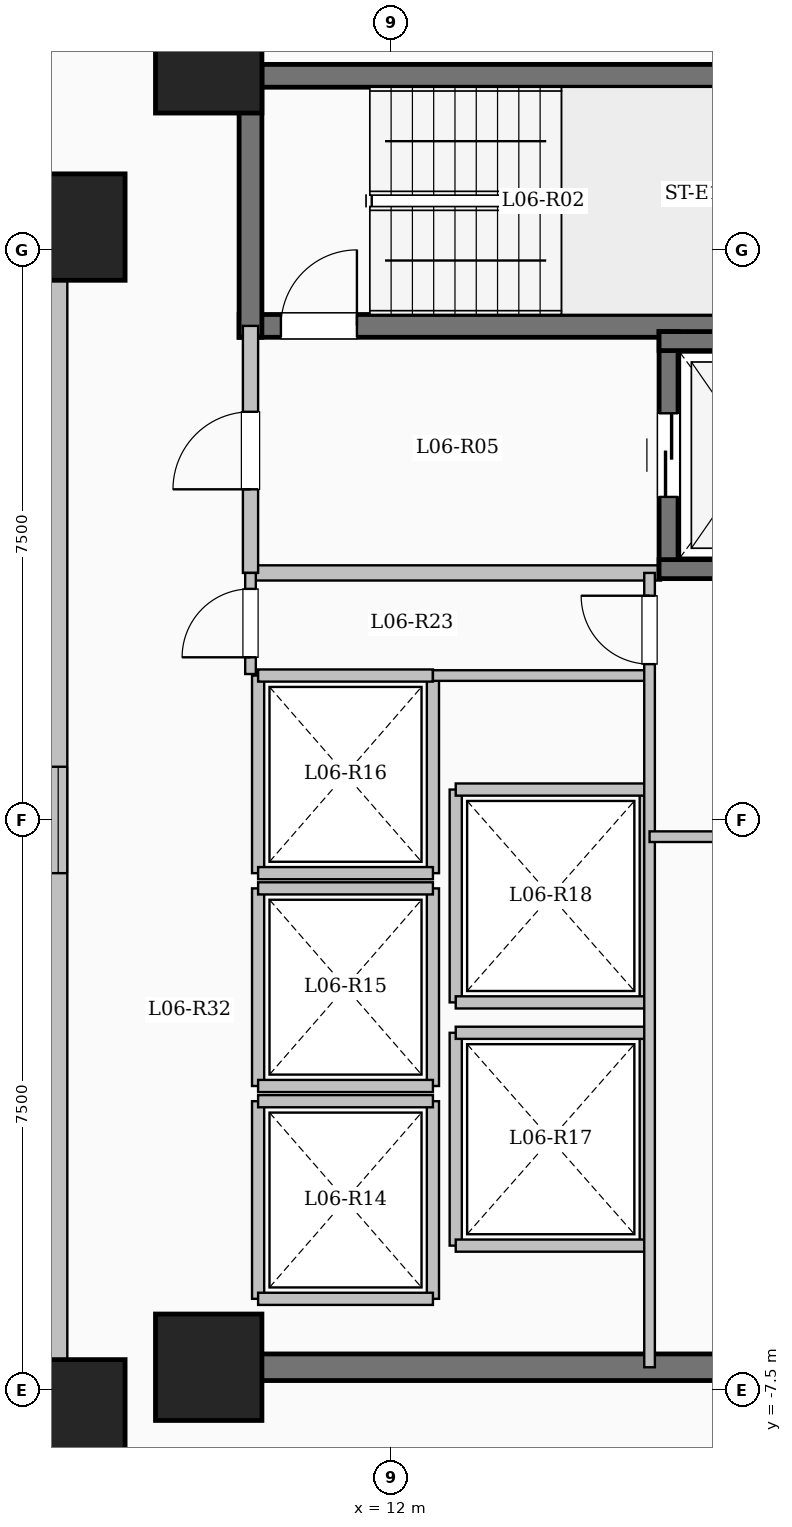
"""IFC4 building model, lengths in metres.
Left out: names, types, materials, properties, quantities, classifications, styles, units other than length and angle.
Written with IfcOpenShell. Run it as: python <this file> out.ifc"""

import sys

from ifc_helpers import new_model, si_unit, direction, frame, frame_2d, origin, origin_2d, place, context, subcontext, project, spatial, rectangle, extrude, element, fill, save


model = new_model("IFC4")
c1 = context("Model", 3, precision=1e-05, world=origin(), true_north=direction((0.0, 1.0)))
c2 = subcontext(c1, "Body", "Model", "MODEL_VIEW")
j1 = project(units=[si_unit("LENGTHUNIT", "METRE"), si_unit("PLANEANGLEUNIT", "RADIAN")], contexts=[c1])
p1 = place(None, origin())
s1 = spatial("IfcSite", under=j1, at=p1, CompositionType="ELEMENT")
p2 = place(p1, origin())
s2 = spatial("IfcBuilding", under=s1, at=p2, CompositionType="ELEMENT")
p3 = place(p2, frame((0.0, 0.0, 27.35)))
s3 = spatial("IfcBuildingStorey", under=s2, at=p3, CompositionType="ELEMENT", Elevation=27.35)
for number, where, z_axis, x_axis in (
    (1, (7.8, -7.8, 0.0), (0.0, 0.0, 1.0), (1.0, 0.0, 0.0)),
    (2, (7.8, 7.8, 0.0), (0.0, 0.0, 1.0), (1.0, 0.0, 0.0)),
    (3, (9.6, -7.2, 0.0), (0.0, 0.0, 1.0), (1.0, 0.0, 0.0)),
    (4, (9.6, 10.0, 0.0), (0.0, 0.0, 1.0), (1.0, 0.0, 0.0)),
):
    element("IfcColumn", number, at=place(p3, frame(where, z_axis=z_axis, x_axis=x_axis)), inside=s3, PredefinedType="COLUMN", context=c2, shape_type="SweptSolid", body=[
        extrude(rectangle(XDim=1.4, YDim=1.4, at=origin_2d()), origin(), (0.0, 0.0, 1.0), 3.35),
    ])
p4 = place(p3, frame((-7.62, -7.62, 0.0), z_axis=(0.0, 0.0, 1.0), x_axis=(1.0, 0.0, 0.0)))
e5 = element("IfcWall", 5, at=p4, inside=s3, PredefinedType="SOLIDWALL", context=c2, shape_type="SweptSolid", body=[
    extrude(rectangle(XDim=15.24, YDim=0.24, at=frame_2d((7.62, 0.0))), origin(), (0.0, 0.0, 1.0), 3.1),
])
p5 = place(p4, frame((6.92, 0.0, 0.95)))
e6 = element("IfcOpeningElement", 6, at=p5, cuts=e5, PredefinedType="OPENING", context=c2, shape_type="SweptSolid", body=[
    extrude(rectangle(XDim=1.4, YDim=1.5, at=frame_2d((0.7, 0.75))), frame((0.0, 0.13, 0.0), z_axis=(0.0, -1.0, 0.0), x_axis=(1.0, 0.0, 0.0)), (0.0, 0.0, 1.0), 0.26),
])
p6 = place(p3, frame((7.62, -7.62, 0.0), z_axis=(0.0, 0.0, 1.0), x_axis=(0.0, 1.0, 0.0)))
e7 = element("IfcWall", 7, at=p6, inside=s3, PredefinedType="SOLIDWALL", context=c2, shape_type="SweptSolid", body=[
    extrude(rectangle(XDim=15.24, YDim=0.24, at=frame_2d((7.62, 0.0))), origin(), (0.0, 0.0, 1.0), 3.1),
])
p7 = place(p6, frame((6.92, 0.0, 0.95)))
e8 = element("IfcOpeningElement", 8, at=p7, cuts=e7, PredefinedType="OPENING", context=c2, shape_type="SweptSolid", body=[
    extrude(rectangle(XDim=1.4, YDim=1.5, at=frame_2d((0.7, 0.75))), frame((0.0, 0.13, 0.0), z_axis=(0.0, -1.0, 0.0), x_axis=(1.0, 0.0, 0.0)), (0.0, 0.0, 1.0), 0.26),
])
p8 = place(p3, frame((7.62, 7.62, 0.0), z_axis=(0.0, 0.0, 1.0), x_axis=(-1.0, 0.0, 0.0)))
e9 = element("IfcWall", 9, at=p8, inside=s3, PredefinedType="SOLIDWALL", context=c2, shape_type="SweptSolid", body=[
    extrude(rectangle(XDim=15.24, YDim=0.24, at=frame_2d((7.62, 0.0))), origin(), (0.0, 0.0, 1.0), 3.1),
])
p9 = place(p8, frame((6.92, 0.0, 0.95)))
e10 = element("IfcOpeningElement", 10, at=p9, cuts=e9, PredefinedType="OPENING", context=c2, shape_type="SweptSolid", body=[
    extrude(rectangle(XDim=1.4, YDim=1.5, at=frame_2d((0.7, 0.75))), frame((0.0, 0.13, 0.0), z_axis=(0.0, -1.0, 0.0), x_axis=(1.0, 0.0, 0.0)), (0.0, 0.0, 1.0), 0.26),
])
p10 = place(p3, frame((10.0, 9.79, 0.0), z_axis=(0.0, 0.0, 1.0), x_axis=(1.0, 0.0, 0.0)))
e11 = element("IfcWall", 11, at=p10, inside=s3, PredefinedType="SHEAR", context=c2, shape_type="SweptSolid", body=[
    extrude(rectangle(XDim=8.0, YDim=0.3, at=frame_2d((4.0, 0.0))), origin(), (0.0, 0.0, 1.0), 3.35),
])
p11 = place(p3, frame((10.0, 6.5, 0.0), z_axis=(0.0, 0.0, 1.0), x_axis=(1.0, 0.0, 0.0)))
e12 = element("IfcWall", 12, at=p11, inside=s3, PredefinedType="SHEAR", context=c2, shape_type="SweptSolid", body=[
    extrude(rectangle(XDim=8.0, YDim=0.3, at=frame_2d((4.0, 0.0))), origin(), (0.0, 0.0, 1.0), 3.35),
])
p12 = place(p11, frame((0.55, 0.0, 0.0)))
e13 = element("IfcOpeningElement", 13, at=p12, cuts=e12, PredefinedType="OPENING", context=c2, shape_type="SweptSolid", body=[
    extrude(rectangle(XDim=1.0, YDim=2.15, at=frame_2d((0.5, 1.075))), frame((0.0, 0.16, 0.0), z_axis=(0.0, -1.0, 0.0), x_axis=(1.0, 0.0, 0.0)), (0.0, 0.0, 1.0), 0.32),
])
p13 = place(p3, frame((10.15, 6.35, 0.0), z_axis=(0.0, 0.0, 1.0), x_axis=(0.0, 1.0, 0.0)))
e14 = element("IfcWall", 14, at=p13, inside=s3, PredefinedType="SHEAR", context=c2, shape_type="SweptSolid", body=[
    extrude(rectangle(XDim=3.59, YDim=0.3, at=frame_2d((1.795, 0.0))), origin(), (0.0, 0.0, 1.0), 3.35),
])
p14 = place(p3, frame((10.15, 3.25, 0.0), z_axis=(0.0, 0.0, 1.0), x_axis=(1.0, 0.0, 0.0)))
e15 = element("IfcWall", 15, at=p14, inside=s3, PredefinedType="SOLIDWALL", context=c2, shape_type="SweptSolid", body=[
    extrude(rectangle(XDim=5.4, YDim=0.2, at=frame_2d((2.7, 0.0))), origin(), (0.0, 0.0, 1.0), 3.1),
])
p15 = place(p3, frame((10.15, 3.25, 0.0), z_axis=(0.0, 0.0, 1.0), x_axis=(0.0, 1.0, 0.0)))
e16 = element("IfcWall", 16, at=p15, inside=s3, PredefinedType="SOLIDWALL", context=c2, shape_type="SweptSolid", body=[
    extrude(rectangle(XDim=3.25, YDim=0.2, at=frame_2d((1.625, 0.0))), origin(), (0.0, 0.0, 1.0), 3.1),
])
p16 = place(p15, frame((1.1, 0.0, 0.0)))
e17 = element("IfcOpeningElement", 17, at=p16, cuts=e16, PredefinedType="OPENING", context=c2, shape_type="SweptSolid", body=[
    extrude(rectangle(XDim=1.02, YDim=2.15, at=frame_2d((0.51, 1.075))), frame((0.0, 0.11, 0.0), z_axis=(0.0, -1.0, 0.0), x_axis=(1.0, 0.0, 0.0)), (0.0, 0.0, 1.0), 0.22),
])
p17 = place(p3, frame((15.65, 3.175, 0.0), z_axis=(0.0, 0.0, 1.0), x_axis=(0.0, 1.0, 0.0)))
e18 = element("IfcWall", 18, at=p17, inside=s3, PredefinedType="SHEAR", context=c2, shape_type="SweptSolid", body=[
    extrude(rectangle(XDim=3.25, YDim=0.25, at=frame_2d((1.625, 0.0))), origin(), (0.0, 0.0, 1.0), 3.35),
])
p18 = place(p17, frame((1.075, 0.0, 0.0)))
e19 = element("IfcOpeningElement", 19, at=p18, cuts=e18, PredefinedType="OPENING", context=c2, shape_type="SweptSolid", body=[
    extrude(rectangle(XDim=1.1, YDim=2.15, at=frame_2d((0.55, 1.075))), frame((0.0, 0.135, 0.0), z_axis=(0.0, -1.0, 0.0), x_axis=(1.0, 0.0, 0.0)), (0.0, 0.0, 1.0), 0.27),
])
for number, where, z_axis, x_axis in (
    (20, (15.525, 3.3, 0.0), (0.0, 0.0, 1.0), (1.0, 0.0, 0.0)),
    (21, (15.525, 6.3, 0.0), (0.0, 0.0, 1.0), (1.0, 0.0, 0.0)),
):
    element("IfcWall", number, at=place(p3, frame(where, z_axis=z_axis, x_axis=x_axis)), inside=s3, PredefinedType="SHEAR", context=c2, shape_type="SweptSolid", body=[
        extrude(rectangle(XDim=2.55, YDim=0.25, at=frame_2d((1.275, 0.0))), origin(), (0.0, 0.0, 1.0), 3.35),
    ])
for number, where, z_axis, x_axis in (
    (22, (10.25, -6.3, 0.0), (0.0, 0.0, 1.0), (0.0, 1.0, 0.0)),
    (23, (12.55, -6.3, 0.0), (0.0, 0.0, 1.0), (0.0, 1.0, 0.0)),
):
    element("IfcWall", number, at=place(p3, frame(where, z_axis=z_axis, x_axis=x_axis)), inside=s3, PredefinedType="SOLIDWALL", context=c2, shape_type="SweptSolid", body=[
        extrude(rectangle(XDim=2.6, YDim=0.16, at=frame_2d((1.3, 0.0))), origin(), (0.0, 0.0, 1.0), 3.1),
    ])
for number, where, z_axis, x_axis in (
    (24, (10.25, -6.3, 0.0), (0.0, 0.0, 1.0), (1.0, 0.0, 0.0)),
    (25, (10.25, -3.7, 0.0), (0.0, 0.0, 1.0), (1.0, 0.0, 0.0)),
):
    element("IfcWall", number, at=place(p3, frame(where, z_axis=z_axis, x_axis=x_axis)), inside=s3, PredefinedType="SOLIDWALL", context=c2, shape_type="SweptSolid", body=[
        extrude(rectangle(XDim=2.3, YDim=0.16, at=frame_2d((1.15, 0.0))), origin(), (0.0, 0.0, 1.0), 3.1),
    ])
for number, where, z_axis, x_axis in (
    (26, (10.25, -3.5, 0.0), (0.0, 0.0, 1.0), (0.0, 1.0, 0.0)),
    (27, (12.55, -3.5, 0.0), (0.0, 0.0, 1.0), (0.0, 1.0, 0.0)),
):
    element("IfcWall", number, at=place(p3, frame(where, z_axis=z_axis, x_axis=x_axis)), inside=s3, PredefinedType="SOLIDWALL", context=c2, shape_type="SweptSolid", body=[
        extrude(rectangle(XDim=2.6, YDim=0.16, at=frame_2d((1.3, 0.0))), origin(), (0.0, 0.0, 1.0), 3.1),
    ])
for number, where, z_axis, x_axis in (
    (28, (10.25, -3.5, 0.0), (0.0, 0.0, 1.0), (1.0, 0.0, 0.0)),
    (29, (10.25, -0.9, 0.0), (0.0, 0.0, 1.0), (1.0, 0.0, 0.0)),
):
    element("IfcWall", number, at=place(p3, frame(where, z_axis=z_axis, x_axis=x_axis)), inside=s3, PredefinedType="SOLIDWALL", context=c2, shape_type="SweptSolid", body=[
        extrude(rectangle(XDim=2.3, YDim=0.16, at=frame_2d((1.15, 0.0))), origin(), (0.0, 0.0, 1.0), 3.1),
    ])
for number, where, z_axis, x_axis in (
    (30, (10.25, -0.7, 0.0), (0.0, 0.0, 1.0), (0.0, 1.0, 0.0)),
    (31, (12.55, -0.7, 0.0), (0.0, 0.0, 1.0), (0.0, 1.0, 0.0)),
):
    element("IfcWall", number, at=place(p3, frame(where, z_axis=z_axis, x_axis=x_axis)), inside=s3, PredefinedType="SOLIDWALL", context=c2, shape_type="SweptSolid", body=[
        extrude(rectangle(XDim=2.6, YDim=0.16, at=frame_2d((1.3, 0.0))), origin(), (0.0, 0.0, 1.0), 3.1),
    ])
for number, where, z_axis, x_axis in (
    (32, (10.25, -0.7, 0.0), (0.0, 0.0, 1.0), (1.0, 0.0, 0.0)),
    (33, (10.25, 1.9, 0.0), (0.0, 0.0, 1.0), (1.0, 0.0, 0.0)),
):
    element("IfcWall", number, at=place(p3, frame(where, z_axis=z_axis, x_axis=x_axis)), inside=s3, PredefinedType="SOLIDWALL", context=c2, shape_type="SweptSolid", body=[
        extrude(rectangle(XDim=2.3, YDim=0.16, at=frame_2d((1.15, 0.0))), origin(), (0.0, 0.0, 1.0), 3.1),
    ])
for number, where, z_axis, x_axis in (
    (34, (12.85, -5.6, 0.0), (0.0, 0.0, 1.0), (0.0, 1.0, 0.0)),
    (35, (15.35, -5.6, 0.0), (0.0, 0.0, 1.0), (0.0, 1.0, 0.0)),
):
    element("IfcWall", number, at=place(p3, frame(where, z_axis=z_axis, x_axis=x_axis)), inside=s3, PredefinedType="SOLIDWALL", context=c2, shape_type="SweptSolid", body=[
        extrude(rectangle(XDim=2.8, YDim=0.16, at=frame_2d((1.4, 0.0))), origin(), (0.0, 0.0, 1.0), 3.1),
    ])
for number, where, z_axis, x_axis in (
    (36, (12.85, -5.6, 0.0), (0.0, 0.0, 1.0), (1.0, 0.0, 0.0)),
    (37, (12.85, -2.8, 0.0), (0.0, 0.0, 1.0), (1.0, 0.0, 0.0)),
):
    element("IfcWall", number, at=place(p3, frame(where, z_axis=z_axis, x_axis=x_axis)), inside=s3, PredefinedType="SOLIDWALL", context=c2, shape_type="SweptSolid", body=[
        extrude(rectangle(XDim=2.5, YDim=0.16, at=frame_2d((1.25, 0.0))), origin(), (0.0, 0.0, 1.0), 3.1),
    ])
for number, where, z_axis, x_axis in (
    (38, (12.85, -2.4, 0.0), (0.0, 0.0, 1.0), (0.0, 1.0, 0.0)),
    (39, (15.35, -2.4, 0.0), (0.0, 0.0, 1.0), (0.0, 1.0, 0.0)),
):
    element("IfcWall", number, at=place(p3, frame(where, z_axis=z_axis, x_axis=x_axis)), inside=s3, PredefinedType="SOLIDWALL", context=c2, shape_type="SweptSolid", body=[
        extrude(rectangle(XDim=2.8, YDim=0.16, at=frame_2d((1.4, 0.0))), origin(), (0.0, 0.0, 1.0), 3.1),
    ])
for number, where, z_axis, x_axis in (
    (40, (12.85, -2.4, 0.0), (0.0, 0.0, 1.0), (1.0, 0.0, 0.0)),
    (41, (12.85, 0.4, 0.0), (0.0, 0.0, 1.0), (1.0, 0.0, 0.0)),
):
    element("IfcWall", number, at=place(p3, frame(where, z_axis=z_axis, x_axis=x_axis)), inside=s3, PredefinedType="SOLIDWALL", context=c2, shape_type="SweptSolid", body=[
        extrude(rectangle(XDim=2.5, YDim=0.16, at=frame_2d((1.25, 0.0))), origin(), (0.0, 0.0, 1.0), 3.1),
    ])
p19 = place(p3, frame((10.075, -7.2, 0.0), z_axis=(0.0, 0.0, 1.0), x_axis=(1.0, 0.0, 0.0)))
e42 = element("IfcWall", 42, at=p19, inside=s3, PredefinedType="SHEAR", context=c2, shape_type="SweptSolid", body=[
    extrude(rectangle(XDim=8.55, YDim=0.35, at=frame_2d((4.275, 0.0))), origin(), (0.0, 0.0, 1.0), 3.35),
])
p20 = place(p3, frame((12.55, 1.9, 0.0), z_axis=(0.0, 0.0, 1.0), x_axis=(1.0, 0.0, 0.0)))
e43 = element("IfcWall", 43, at=p20, inside=s3, PredefinedType="PARTITIONING", context=c2, shape_type="SweptSolid", body=[
    extrude(rectangle(XDim=2.85, YDim=0.14, at=frame_2d((1.425, 0.0))), origin(), (0.0, 0.0, 1.0), 3.1),
])
p21 = place(p3, frame((10.15, 1.92, 0.0), z_axis=(0.0, 0.0, 1.0), x_axis=(0.0, 1.0, 0.0)))
e44 = element("IfcWall", 44, at=p21, inside=s3, PredefinedType="PARTITIONING", context=c2, shape_type="SweptSolid", body=[
    extrude(rectangle(XDim=1.33, YDim=0.14, at=frame_2d((0.665, 0.0))), origin(), (0.0, 0.0, 1.0), 3.1),
])
p22 = place(p21, frame((0.22, 0.0, 0.0)))
e45 = element("IfcOpeningElement", 45, at=p22, cuts=e44, PredefinedType="OPENING", context=c2, shape_type="SweptSolid", body=[
    extrude(rectangle(XDim=0.9, YDim=2.08, at=frame_2d((0.45, 1.04))), frame((0.0, 0.08, 0.0), z_axis=(0.0, -1.0, 0.0), x_axis=(1.0, 0.0, 0.0)), (0.0, 0.0, 1.0), 0.16),
])
p23 = place(p3, frame((15.4, -7.2, 0.0), z_axis=(0.0, 0.0, 1.0), x_axis=(0.0, 1.0, 0.0)))
e46 = element("IfcWall", 46, at=p23, inside=s3, PredefinedType="PARTITIONING", context=c2, shape_type="SweptSolid", body=[
    extrude(rectangle(XDim=10.45, YDim=0.14, at=frame_2d((5.225, 0.0))), origin(), (0.0, 0.0, 1.0), 3.1),
])
p24 = place(p23, frame((9.25, 0.0, 0.0)))
e47 = element("IfcOpeningElement", 47, at=p24, cuts=e46, PredefinedType="OPENING", context=c2, shape_type="SweptSolid", body=[
    extrude(rectangle(XDim=0.9, YDim=2.08, at=frame_2d((0.45, 1.04))), frame((0.0, 0.08, 0.0), z_axis=(0.0, -1.0, 0.0), x_axis=(1.0, 0.0, 0.0)), (0.0, 0.0, 1.0), 0.16),
])
p25 = place(p3, frame((15.4, -0.22, 0.0), z_axis=(0.0, 0.0, 1.0), x_axis=(1.0, 0.0, 0.0)))
e48 = element("IfcWall", 48, at=p25, inside=s3, PredefinedType="PARTITIONING", context=c2, shape_type="SweptSolid", body=[
    extrude(rectangle(XDim=3.05, YDim=0.14, at=frame_2d((1.525, 0.0))), origin(), (0.0, 0.0, 1.0), 3.1),
])
p26 = place(p25, frame((1.05, 0.0, 0.0)))
e49 = element("IfcOpeningElement", 49, at=p26, cuts=e48, PredefinedType="OPENING", context=c2, shape_type="SweptSolid", body=[
    extrude(rectangle(XDim=0.9, YDim=2.08, at=frame_2d((0.45, 1.04))), frame((0.0, 0.08, 0.0), z_axis=(0.0, -1.0, 0.0), x_axis=(1.0, 0.0, 0.0)), (0.0, 0.0, 1.0), 0.16),
])
p27 = place(p7, origin())
e50 = element("IfcWindow", 50, at=p27, inside=s3, PartitioningType="SINGLE_PANEL", PredefinedType="WINDOW", context=c2, shape_type="SweptSolid", body=[
    extrude(rectangle(XDim=1.4, YDim=1.5, at=frame_2d((0.7, 0.75))), frame((0.0, 0.03, 0.0), z_axis=(0.0, -1.0, 0.0), x_axis=(1.0, 0.0, 0.0)), (0.0, 0.0, 1.0), 0.06),
])
fill(e8, e50)
p28 = place(p12, origin())
e51 = element("IfcDoor", 51, at=p28, inside=s3, OperationType="SINGLE_SWING_RIGHT", PredefinedType="DOOR", context=c2, shape_type="SweptSolid", body=[
    extrude(rectangle(XDim=1.0, YDim=2.15, at=frame_2d((0.5, 1.075))), frame((0.0, 0.025, 0.0), z_axis=(0.0, -1.0, 0.0), x_axis=(1.0, 0.0, 0.0)), (0.0, 0.0, 1.0), 0.05),
])
fill(e13, e51)
p29 = place(p16, origin())
e52 = element("IfcDoor", 52, at=p29, inside=s3, OperationType="SINGLE_SWING_LEFT", PredefinedType="DOOR", context=c2, shape_type="SweptSolid", body=[
    extrude(rectangle(XDim=1.02, YDim=2.15, at=frame_2d((0.51, 1.075))), frame((0.0, 0.025, 0.0), z_axis=(0.0, -1.0, 0.0), x_axis=(1.0, 0.0, 0.0)), (0.0, 0.0, 1.0), 0.05),
])
fill(e17, e52)
p30 = place(p18, origin())
e53 = element("IfcDoor", 53, at=p30, inside=s3, OperationType="SLIDING_TO_LEFT", PredefinedType="DOOR", context=c2, shape_type="SweptSolid", body=[
    extrude(rectangle(XDim=1.1, YDim=2.15, at=frame_2d((0.55, 1.075))), frame((0.0, 0.025, 0.0), z_axis=(0.0, -1.0, 0.0), x_axis=(1.0, 0.0, 0.0)), (0.0, 0.0, 1.0), 0.05),
])
fill(e19, e53)
p31 = place(p22, origin())
e54 = element("IfcDoor", 54, at=p31, inside=s3, OperationType="SINGLE_SWING_LEFT", PredefinedType="DOOR", context=c2, shape_type="SweptSolid", body=[
    extrude(rectangle(XDim=0.9, YDim=2.08, at=frame_2d((0.45, 1.04))), frame((0.0, 0.025, 0.0), z_axis=(0.0, -1.0, 0.0), x_axis=(1.0, 0.0, 0.0)), (0.0, 0.0, 1.0), 0.05),
])
fill(e45, e54)
p32 = place(p24, origin())
e55 = element("IfcDoor", 55, at=p32, inside=s3, OperationType="SINGLE_SWING_RIGHT", PredefinedType="DOOR", context=c2, shape_type="SweptSolid", body=[
    extrude(rectangle(XDim=0.9, YDim=2.08, at=frame_2d((0.45, 1.04))), frame((0.0, 0.025, 0.0), z_axis=(0.0, -1.0, 0.0), x_axis=(1.0, 0.0, 0.0)), (0.0, 0.0, 1.0), 0.05),
])
fill(e47, e55)
save(model, sys.argv[1])
